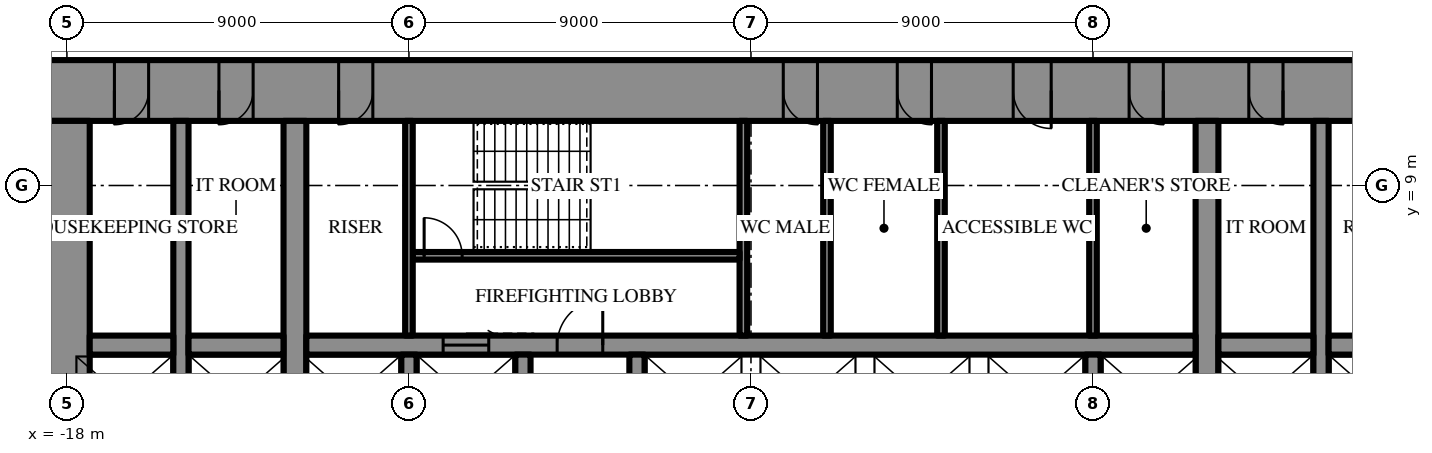
"""IFC4 building model, lengths in metres.
Left out: names, types, materials, properties, quantities, classifications, styles, units other than length and angle.
Written with IfcOpenShell. Run it as: python <this file> out.ifc"""

import sys

from ifc_helpers import new_model, si_unit, direction, frame, frame_2d, origin, place, context, subcontext, project, spatial, rectangle, extrude, element, fill, save


model = new_model("IFC4")
c1 = context("Model", 3, precision=1e-05, world=origin(), true_north=direction((0.0, 1.0)))
c2 = subcontext(c1, "Body", "Model", "MODEL_VIEW")
j1 = project(units=[si_unit("LENGTHUNIT", "METRE"), si_unit("PLANEANGLEUNIT", "RADIAN")], contexts=[c1])
p1 = place(None, origin())
s1 = spatial("IfcSite", under=j1, at=p1, CompositionType="ELEMENT")
p2 = place(p1, origin())
s2 = spatial("IfcBuilding", under=s1, at=p2, CompositionType="ELEMENT")
p3 = place(p2, frame((0.0, 0.0, 65.5)))
s3 = spatial("IfcBuildingStorey", under=s2, at=p3, CompositionType="ELEMENT", Elevation=65.5)
p4 = place(p3, frame((-18.6, 11.5, 0.0), z_axis=(0.0, 0.0, 1.0), x_axis=(1.0, 0.0, 0.0)))
e1 = element("IfcWall", 1, at=p4, inside=s3, PredefinedType="SHEAR", context=c2, shape_type="SweptSolid", body=[
    extrude(rectangle(XDim=37.2, YDim=1.6, at=frame_2d((18.6, 0.0))), origin(), (0.0, 0.0, 1.0), 4.2),
])
p5 = place(p4, frame((19.45, 0.0, 0.0)))
e2 = element("IfcOpeningElement", 2, at=p5, cuts=e1, PredefinedType="OPENING", context=c2, shape_type="SweptSolid", body=[
    extrude(rectangle(XDim=0.9, YDim=2.2, at=frame_2d((0.45, 1.1))), frame((0.0, 0.81, 0.0), z_axis=(0.0, -1.0, 0.0), x_axis=(1.0, 0.0, 0.0)), (0.0, 0.0, 1.0), 1.62),
])
p6 = place(p4, frame((22.45, 0.0, 0.0)))
e3 = element("IfcOpeningElement", 3, at=p6, cuts=e1, PredefinedType="OPENING", context=c2, shape_type="SweptSolid", body=[
    extrude(rectangle(XDim=0.9, YDim=2.2, at=frame_2d((0.45, 1.1))), frame((0.0, 0.81, 0.0), z_axis=(0.0, -1.0, 0.0), x_axis=(1.0, 0.0, 0.0)), (0.0, 0.0, 1.0), 1.62),
])
p7 = place(p4, frame((25.5, 0.0, 0.0)))
e4 = element("IfcOpeningElement", 4, at=p7, cuts=e1, PredefinedType="OPENING", context=c2, shape_type="SweptSolid", body=[
    extrude(rectangle(XDim=1.0, YDim=2.2, at=frame_2d((0.5, 1.1))), frame((0.0, 0.81, 0.0), z_axis=(0.0, -1.0, 0.0), x_axis=(1.0, 0.0, 0.0)), (0.0, 0.0, 1.0), 1.62),
])
p8 = place(p4, frame((1.85, 0.0, 0.0)))
e5 = element("IfcOpeningElement", 5, at=p8, cuts=e1, PredefinedType="OPENING", context=c2, shape_type="SweptSolid", body=[
    extrude(rectangle(XDim=0.9, YDim=2.2, at=frame_2d((0.45, 1.1))), frame((0.0, 0.81, 0.0), z_axis=(0.0, -1.0, 0.0), x_axis=(1.0, 0.0, 0.0)), (0.0, 0.0, 1.0), 1.62),
])
p9 = place(p4, frame((4.6, 0.0, 0.0)))
e6 = element("IfcOpeningElement", 6, at=p9, cuts=e1, PredefinedType="OPENING", context=c2, shape_type="SweptSolid", body=[
    extrude(rectangle(XDim=0.9, YDim=2.2, at=frame_2d((0.45, 1.1))), frame((0.0, 0.81, 0.0), z_axis=(0.0, -1.0, 0.0), x_axis=(1.0, 0.0, 0.0)), (0.0, 0.0, 1.0), 1.62),
])
p10 = place(p4, frame((7.75, 0.0, 0.0)))
e7 = element("IfcOpeningElement", 7, at=p10, cuts=e1, PredefinedType="OPENING", context=c2, shape_type="SweptSolid", body=[
    extrude(rectangle(XDim=0.9, YDim=2.2, at=frame_2d((0.45, 1.1))), frame((0.0, 0.81, 0.0), z_axis=(0.0, -1.0, 0.0), x_axis=(1.0, 0.0, 0.0)), (0.0, 0.0, 1.0), 1.62),
])
p11 = place(p4, frame((28.55, 0.0, 0.0)))
e8 = element("IfcOpeningElement", 8, at=p11, cuts=e1, PredefinedType="OPENING", context=c2, shape_type="SweptSolid", body=[
    extrude(rectangle(XDim=0.9, YDim=2.2, at=frame_2d((0.45, 1.1))), frame((0.0, 0.81, 0.0), z_axis=(0.0, -1.0, 0.0), x_axis=(1.0, 0.0, 0.0)), (0.0, 0.0, 1.0), 1.62),
])
p12 = place(p4, frame((31.7, 0.0, 0.0)))
e9 = element("IfcOpeningElement", 9, at=p12, cuts=e1, PredefinedType="OPENING", context=c2, shape_type="SweptSolid", body=[
    extrude(rectangle(XDim=0.9, YDim=2.2, at=frame_2d((0.45, 1.1))), frame((0.0, 0.81, 0.0), z_axis=(0.0, -1.0, 0.0), x_axis=(1.0, 0.0, 0.0)), (0.0, 0.0, 1.0), 1.62),
])
p13 = place(p4, frame((34.45, 0.0, 0.0)))
e10 = element("IfcOpeningElement", 10, at=p13, cuts=e1, PredefinedType="OPENING", context=c2, shape_type="SweptSolid", body=[
    extrude(rectangle(XDim=0.9, YDim=2.2, at=frame_2d((0.45, 1.1))), frame((0.0, 0.81, 0.0), z_axis=(0.0, -1.0, 0.0), x_axis=(1.0, 0.0, 0.0)), (0.0, 0.0, 1.0), 1.62),
])
p14 = place(p3, frame((-18.0, 10.7, 0.0), z_axis=(0.0, 0.0, 1.0), x_axis=(0.0, -1.0, 0.0)))
e11 = element("IfcWall", 11, at=p14, inside=s3, PredefinedType="SHEAR", context=c2, shape_type="SweptSolid", body=[
    extrude(rectangle(XDim=21.4, YDim=1.2, at=frame_2d((10.7, 0.0))), origin(), (0.0, 0.0, 1.0), 4.2),
])
p15 = place(p14, frame((9.8, 0.0, 0.0)))
e12 = element("IfcOpeningElement", 12, at=p15, cuts=e11, PredefinedType="OPENING", context=c2, shape_type="SweptSolid", body=[
    extrude(rectangle(XDim=1.8, YDim=2.4, at=frame_2d((0.9, 1.2))), frame((0.0, 0.61, 0.0), z_axis=(0.0, -1.0, 0.0), x_axis=(1.0, 0.0, 0.0)), (0.0, 0.0, 1.0), 1.22),
])
p16 = place(p3, frame((12.0, -10.7, 0.0), z_axis=(0.0, 0.0, 1.0), x_axis=(0.0, 1.0, 0.0)))
e13 = element("IfcWall", 13, at=p16, inside=s3, PredefinedType="SHEAR", context=c2, shape_type="SweptSolid", body=[
    extrude(rectangle(XDim=21.4, YDim=0.6, at=frame_2d((10.7, 0.0))), origin(), (0.0, 0.0, 1.0), 4.2),
])
p17 = place(p16, frame((9.8, 0.0, 0.0)))
e14 = element("IfcOpeningElement", 14, at=p17, cuts=e13, PredefinedType="OPENING", context=c2, shape_type="SweptSolid", body=[
    extrude(rectangle(XDim=1.8, YDim=2.4, at=frame_2d((0.9, 1.2))), frame((0.0, 0.31, 0.0), z_axis=(0.0, -1.0, 0.0), x_axis=(1.0, 0.0, 0.0)), (0.0, 0.0, 1.0), 0.62),
])
p18 = place(p3, frame((-12.0, -10.7, 0.0), z_axis=(0.0, 0.0, 1.0), x_axis=(0.0, 1.0, 0.0)))
e15 = element("IfcWall", 15, at=p18, inside=s3, PredefinedType="SHEAR", context=c2, shape_type="SweptSolid", body=[
    extrude(rectangle(XDim=21.4, YDim=0.6, at=frame_2d((10.7, 0.0))), origin(), (0.0, 0.0, 1.0), 4.2),
])
p19 = place(p18, frame((9.8, 0.0, 0.0)))
e16 = element("IfcOpeningElement", 16, at=p19, cuts=e15, PredefinedType="OPENING", context=c2, shape_type="SweptSolid", body=[
    extrude(rectangle(XDim=1.8, YDim=2.4, at=frame_2d((0.9, 1.2))), frame((0.0, 0.31, 0.0), z_axis=(0.0, -1.0, 0.0), x_axis=(1.0, 0.0, 0.0)), (0.0, 0.0, 1.0), 0.62),
])
p20 = place(p3, frame((15.0, -10.7, 0.0), z_axis=(0.0, 0.0, 1.0), x_axis=(0.0, 1.0, 0.0)))
e17 = element("IfcWall", 17, at=p20, inside=s3, PredefinedType="SHEAR", context=c2, shape_type="SweptSolid", body=[
    extrude(rectangle(XDim=21.4, YDim=0.4, at=frame_2d((10.7, 0.0))), origin(), (0.0, 0.0, 1.0), 4.2),
])
p21 = place(p20, frame((9.8, 0.0, 0.0)))
e18 = element("IfcOpeningElement", 18, at=p21, cuts=e17, PredefinedType="OPENING", context=c2, shape_type="SweptSolid", body=[
    extrude(rectangle(XDim=1.8, YDim=2.4, at=frame_2d((0.9, 1.2))), frame((0.0, 0.21, 0.0), z_axis=(0.0, -1.0, 0.0), x_axis=(1.0, 0.0, 0.0)), (0.0, 0.0, 1.0), 0.42),
])
p22 = place(p3, frame((-15.0, -10.7, 0.0), z_axis=(0.0, 0.0, 1.0), x_axis=(0.0, 1.0, 0.0)))
e19 = element("IfcWall", 19, at=p22, inside=s3, PredefinedType="SHEAR", context=c2, shape_type="SweptSolid", body=[
    extrude(rectangle(XDim=21.4, YDim=0.4, at=frame_2d((10.7, 0.0))), origin(), (0.0, 0.0, 1.0), 4.2),
])
p23 = place(p22, frame((9.8, 0.0, 0.0)))
e20 = element("IfcOpeningElement", 20, at=p23, cuts=e19, PredefinedType="OPENING", context=c2, shape_type="SweptSolid", body=[
    extrude(rectangle(XDim=1.8, YDim=2.4, at=frame_2d((0.9, 1.2))), frame((0.0, 0.21, 0.0), z_axis=(0.0, -1.0, 0.0), x_axis=(1.0, 0.0, 0.0)), (0.0, 0.0, 1.0), 0.42),
])
p24 = place(p3, frame((-17.4, 4.8, 0.0), z_axis=(0.0, 0.0, 1.0), x_axis=(1.0, 0.0, 0.0)))
e21 = element("IfcWall", 21, at=p24, inside=s3, PredefinedType="SHEAR", context=c2, shape_type="SweptSolid", body=[
    extrude(rectangle(XDim=2.2, YDim=0.5, at=frame_2d((1.1, 0.0))), origin(), (0.0, 0.0, 1.0), 4.2),
])
p25 = place(p3, frame((-14.8, 4.8, 0.0), z_axis=(0.0, 0.0, 1.0), x_axis=(1.0, 0.0, 0.0)))
e22 = element("IfcWall", 22, at=p25, inside=s3, PredefinedType="SHEAR", context=c2, shape_type="SweptSolid", body=[
    extrude(rectangle(XDim=2.5, YDim=0.5, at=frame_2d((1.25, 0.0))), origin(), (0.0, 0.0, 1.0), 4.2),
])
p26 = place(p3, frame((-11.7, 4.8, 0.0), z_axis=(0.0, 0.0, 1.0), x_axis=(1.0, 0.0, 0.0)))
e23 = element("IfcWall", 23, at=p26, inside=s3, PredefinedType="SHEAR", context=c2, shape_type="SweptSolid", body=[
    extrude(rectangle(XDim=23.4, YDim=0.5, at=frame_2d((11.7, 0.0))), origin(), (0.0, 0.0, 1.0), 4.2),
])
p27 = place(p26, frame((6.6, 0.0, 0.0)))
e24 = element("IfcOpeningElement", 24, at=p27, cuts=e23, PredefinedType="OPENING", context=c2, shape_type="SweptSolid", body=[
    extrude(rectangle(XDim=1.2, YDim=2.2, at=frame_2d((0.6, 1.1))), frame((0.0, 0.26, 0.0), z_axis=(0.0, -1.0, 0.0), x_axis=(1.0, 0.0, 0.0)), (0.0, 0.0, 1.0), 0.52),
])
p28 = place(p26, frame((3.6, 0.0, 0.0)))
e25 = element("IfcOpeningElement", 25, at=p28, cuts=e23, PredefinedType="OPENING", context=c2, shape_type="SweptSolid", body=[
    extrude(rectangle(XDim=1.2, YDim=2.2, at=frame_2d((0.6, 1.1))), frame((0.0, 0.26, 0.0), z_axis=(0.0, -1.0, 0.0), x_axis=(1.0, 0.0, 0.0)), (0.0, 0.0, 1.0), 0.52),
])
p29 = place(p3, frame((12.3, 4.8, 0.0), z_axis=(0.0, 0.0, 1.0), x_axis=(1.0, 0.0, 0.0)))
e26 = element("IfcWall", 26, at=p29, inside=s3, PredefinedType="SHEAR", context=c2, shape_type="SweptSolid", body=[
    extrude(rectangle(XDim=2.5, YDim=0.5, at=frame_2d((1.25, 0.0))), origin(), (0.0, 0.0, 1.0), 4.2),
])
p30 = place(p3, frame((15.2, 4.8, 0.0), z_axis=(0.0, 0.0, 1.0), x_axis=(1.0, 0.0, 0.0)))
e27 = element("IfcWall", 27, at=p30, inside=s3, PredefinedType="SHEAR", context=c2, shape_type="SweptSolid", body=[
    extrude(rectangle(XDim=2.2, YDim=0.5, at=frame_2d((1.1, 0.0))), origin(), (0.0, 0.0, 1.0), 4.2),
])
for number, where, z_axis, x_axis in (
    (28, (-9.0, 2.25, 0.0), (0.0, 0.0, 1.0), (0.0, 1.0, 0.0)),
    (29, (-6.0, 2.25, 0.0), (0.0, 0.0, 1.0), (0.0, 1.0, 0.0)),
    (30, (-3.0, 2.25, 0.0), (0.0, 0.0, 1.0), (0.0, 1.0, 0.0)),
    (31, (9.0, 2.25, 0.0), (0.0, 0.0, 1.0), (0.0, 1.0, 0.0)),
):
    element("IfcWall", number, at=place(p3, frame(where, z_axis=z_axis, x_axis=x_axis)), inside=s3, PredefinedType="SHEAR", context=c2, shape_type="SweptSolid", body=[
        extrude(rectangle(XDim=2.3, YDim=0.4, at=frame_2d((1.15, 0.0))), origin(), (0.0, 0.0, 1.0), 4.2),
    ])
p31 = place(p3, frame((-0.2, 5.05, 0.0), z_axis=(0.0, 0.0, 1.0), x_axis=(0.0, 1.0, 0.0)))
e32 = element("IfcWall", 32, at=p31, inside=s3, PredefinedType="SHEAR", context=c2, shape_type="SweptSolid", body=[
    extrude(rectangle(XDim=5.65, YDim=0.2, at=frame_2d((2.825, 0.0))), origin(), (0.0, 0.0, 1.0), 4.2),
])
p32 = place(p3, frame((-8.9, 7.15, 0.0), z_axis=(0.0, 0.0, 1.0), x_axis=(1.0, 0.0, 0.0)))
e33 = element("IfcWall", 33, at=p32, inside=s3, PredefinedType="SHEAR", context=c2, shape_type="SweptSolid", body=[
    extrude(rectangle(XDim=8.6, YDim=0.2, at=frame_2d((4.3, 0.0))), origin(), (0.0, 0.0, 1.0), 4.2),
])
p33 = place(p32, frame((0.3, 0.0, 0.0)))
e34 = element("IfcOpeningElement", 34, at=p33, cuts=e33, PredefinedType="OPENING", context=c2, shape_type="SweptSolid", body=[
    extrude(rectangle(XDim=1.0, YDim=2.2, at=frame_2d((0.5, 1.1))), frame((0.0, 0.11, 0.0), z_axis=(0.0, -1.0, 0.0), x_axis=(1.0, 0.0, 0.0)), (0.0, 0.0, 1.0), 0.22),
])
for number, where, z_axis, x_axis in (
    (35, (-9.0, 5.05, 0.0), (0.0, 0.0, 1.0), (0.0, 1.0, 0.0)),
    (36, (9.0, 5.05, 0.0), (0.0, 0.0, 1.0), (0.0, 1.0, 0.0)),
    (37, (2.0, 5.05, 0.0), (0.0, 0.0, 1.0), (0.0, 1.0, 0.0)),
    (38, (5.0, 5.05, 0.0), (0.0, 0.0, 1.0), (0.0, 1.0, 0.0)),
):
    element("IfcWall", number, at=place(p3, frame(where, z_axis=z_axis, x_axis=x_axis)), inside=s3, PredefinedType="PARTITIONING", context=c2, shape_type="SweptSolid", body=[
        extrude(rectangle(XDim=5.65, YDim=0.2, at=frame_2d((2.825, 0.0))), origin(), (0.0, 0.0, 1.0), 4.0),
    ])
p34 = place(p27, origin())
e39 = element("IfcDoor", 39, at=p34, inside=s3, OperationType="SINGLE_SWING_LEFT", PredefinedType="DOOR", context=c2, shape_type="SweptSolid", body=[
    extrude(rectangle(XDim=1.2, YDim=2.2, at=frame_2d((0.6, 1.1))), frame((0.0, 0.025, 0.0), z_axis=(0.0, -1.0, 0.0), x_axis=(1.0, 0.0, 0.0)), (0.0, 0.0, 1.0), 0.05),
])
fill(e24, e39)
p35 = place(p33, origin())
e40 = element("IfcDoor", 40, at=p35, inside=s3, OperationType="SINGLE_SWING_RIGHT", PredefinedType="DOOR", context=c2, shape_type="SweptSolid", body=[
    extrude(rectangle(XDim=1.0, YDim=2.2, at=frame_2d((0.5, 1.1))), frame((0.0, 0.025, 0.0), z_axis=(0.0, -1.0, 0.0), x_axis=(1.0, 0.0, 0.0)), (0.0, 0.0, 1.0), 0.05),
])
fill(e34, e40)
p36 = place(p5, frame((0.9, 0.0, 0.0), z_axis=(0.0, 0.0, 1.0), x_axis=(-1.0, 0.0, 0.0)))
e41 = element("IfcDoor", 41, at=p36, inside=s3, OperationType="SINGLE_SWING_RIGHT", PredefinedType="DOOR", context=c2, shape_type="SweptSolid", body=[
    extrude(rectangle(XDim=0.9, YDim=2.2, at=frame_2d((0.45, 1.1))), frame((0.0, 0.025, 0.0), z_axis=(0.0, -1.0, 0.0), x_axis=(1.0, 0.0, 0.0)), (0.0, 0.0, 1.0), 0.05),
])
fill(e2, e41)
p37 = place(p6, frame((0.9, 0.0, 0.0), z_axis=(0.0, 0.0, 1.0), x_axis=(-1.0, 0.0, 0.0)))
e42 = element("IfcDoor", 42, at=p37, inside=s3, OperationType="SINGLE_SWING_RIGHT", PredefinedType="DOOR", context=c2, shape_type="SweptSolid", body=[
    extrude(rectangle(XDim=0.9, YDim=2.2, at=frame_2d((0.45, 1.1))), frame((0.0, 0.025, 0.0), z_axis=(0.0, -1.0, 0.0), x_axis=(1.0, 0.0, 0.0)), (0.0, 0.0, 1.0), 0.05),
])
fill(e3, e42)
p38 = place(p7, frame((1.0, 0.0, 0.0), z_axis=(0.0, 0.0, 1.0), x_axis=(-1.0, 0.0, 0.0)))
e43 = element("IfcDoor", 43, at=p38, inside=s3, OperationType="SINGLE_SWING_RIGHT", PredefinedType="DOOR", context=c2, shape_type="SweptSolid", body=[
    extrude(rectangle(XDim=1.0, YDim=2.2, at=frame_2d((0.5, 1.1))), frame((0.0, 0.025, 0.0), z_axis=(0.0, -1.0, 0.0), x_axis=(1.0, 0.0, 0.0)), (0.0, 0.0, 1.0), 0.05),
])
fill(e4, e43)
p39 = place(p8, frame((0.9, 0.0, 0.0), z_axis=(0.0, 0.0, 1.0), x_axis=(-1.0, 0.0, 0.0)))
e44 = element("IfcDoor", 44, at=p39, inside=s3, OperationType="SINGLE_SWING_LEFT", PredefinedType="DOOR", context=c2, shape_type="SweptSolid", body=[
    extrude(rectangle(XDim=0.9, YDim=2.2, at=frame_2d((0.45, 1.1))), frame((0.0, 0.025, 0.0), z_axis=(0.0, -1.0, 0.0), x_axis=(1.0, 0.0, 0.0)), (0.0, 0.0, 1.0), 0.05),
])
fill(e5, e44)
p40 = place(p9, frame((0.9, 0.0, 0.0), z_axis=(0.0, 0.0, 1.0), x_axis=(-1.0, 0.0, 0.0)))
e45 = element("IfcDoor", 45, at=p40, inside=s3, OperationType="SINGLE_SWING_LEFT", PredefinedType="DOOR", context=c2, shape_type="SweptSolid", body=[
    extrude(rectangle(XDim=0.9, YDim=2.2, at=frame_2d((0.45, 1.1))), frame((0.0, 0.025, 0.0), z_axis=(0.0, -1.0, 0.0), x_axis=(1.0, 0.0, 0.0)), (0.0, 0.0, 1.0), 0.05),
])
fill(e6, e45)
p41 = place(p10, frame((0.9, 0.0, 0.0), z_axis=(0.0, 0.0, 1.0), x_axis=(-1.0, 0.0, 0.0)))
e46 = element("IfcDoor", 46, at=p41, inside=s3, OperationType="SINGLE_SWING_LEFT", PredefinedType="DOOR", context=c2, shape_type="SweptSolid", body=[
    extrude(rectangle(XDim=0.9, YDim=2.2, at=frame_2d((0.45, 1.1))), frame((0.0, 0.025, 0.0), z_axis=(0.0, -1.0, 0.0), x_axis=(1.0, 0.0, 0.0)), (0.0, 0.0, 1.0), 0.05),
])
fill(e7, e46)
p42 = place(p11, frame((0.9, 0.0, 0.0), z_axis=(0.0, 0.0, 1.0), x_axis=(-1.0, 0.0, 0.0)))
e47 = element("IfcDoor", 47, at=p42, inside=s3, OperationType="SINGLE_SWING_RIGHT", PredefinedType="DOOR", context=c2, shape_type="SweptSolid", body=[
    extrude(rectangle(XDim=0.9, YDim=2.2, at=frame_2d((0.45, 1.1))), frame((0.0, 0.025, 0.0), z_axis=(0.0, -1.0, 0.0), x_axis=(1.0, 0.0, 0.0)), (0.0, 0.0, 1.0), 0.05),
])
fill(e8, e47)
p43 = place(p12, frame((0.9, 0.0, 0.0), z_axis=(0.0, 0.0, 1.0), x_axis=(-1.0, 0.0, 0.0)))
e48 = element("IfcDoor", 48, at=p43, inside=s3, OperationType="SINGLE_SWING_RIGHT", PredefinedType="DOOR", context=c2, shape_type="SweptSolid", body=[
    extrude(rectangle(XDim=0.9, YDim=2.2, at=frame_2d((0.45, 1.1))), frame((0.0, 0.025, 0.0), z_axis=(0.0, -1.0, 0.0), x_axis=(1.0, 0.0, 0.0)), (0.0, 0.0, 1.0), 0.05),
])
fill(e9, e48)
p44 = place(p28, origin())
e49 = element("IfcDoor", 49, at=p44, inside=s3, OperationType="SLIDING_TO_LEFT", PredefinedType="DOOR", context=c2, shape_type="SweptSolid", body=[
    extrude(rectangle(XDim=1.2, YDim=2.2, at=frame_2d((0.6, 1.1))), frame((0.0, 0.025, 0.0), z_axis=(0.0, -1.0, 0.0), x_axis=(1.0, 0.0, 0.0)), (0.0, 0.0, 1.0), 0.05),
])
fill(e25, e49)
save(model, sys.argv[1])
